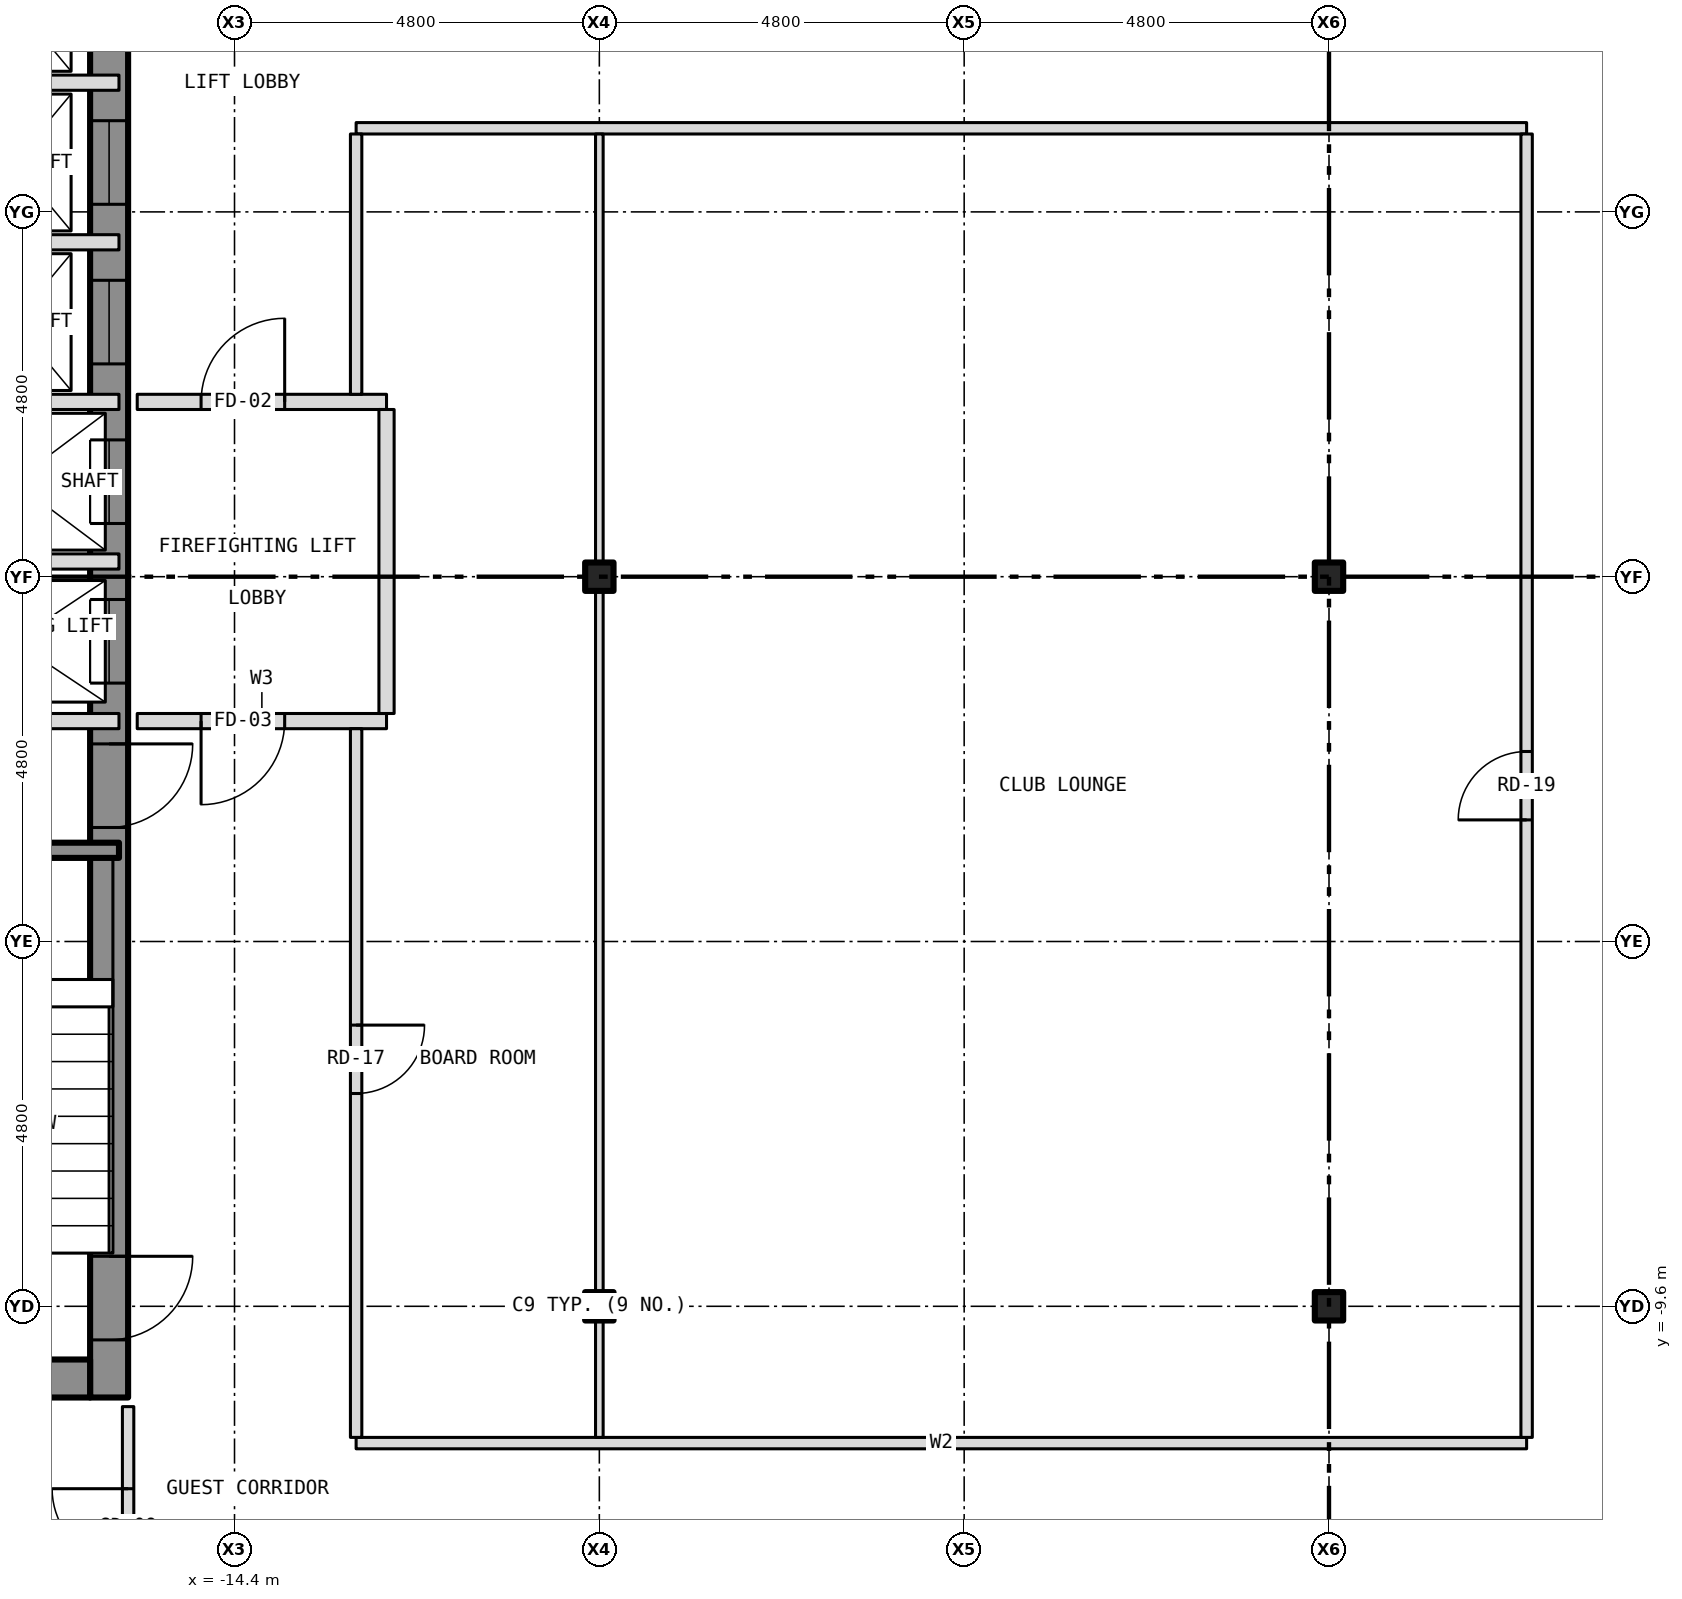
"""IFC4 building model, lengths in metres.
Left out: names, types, materials, properties, quantities, classifications, styles, units other than length and angle.
Written with IfcOpenShell. Run it as: python <this file> out.ifc"""

import sys

from ifc_helpers import new_model, si_unit, direction, frame, frame_2d, origin, origin_2d, place, context, subcontext, project, spatial, rectangle, i_section, extrude, element, fill, save


model = new_model("IFC4")
c1 = context("Model", 3, precision=1e-05, world=origin(), true_north=direction((0.0, 1.0)))
c2 = subcontext(c1, "Body", "Model", "MODEL_VIEW")
j1 = project(units=[si_unit("LENGTHUNIT", "METRE"), si_unit("PLANEANGLEUNIT", "RADIAN")], contexts=[c1])
p1 = place(None, origin())
s1 = spatial("IfcSite", under=j1, at=p1, CompositionType="ELEMENT")
p2 = place(p1, origin())
s2 = spatial("IfcBuilding", under=s1, at=p2, CompositionType="ELEMENT")
p3 = place(p2, frame((0.0, 0.0, 162.0)))
s3 = spatial("IfcBuildingStorey", under=s2, at=p3, CompositionType="ELEMENT", Elevation=162.0)
for number, where, z_axis, x_axis in (
    (1, (-9.6, -9.6, -0.15), (0.0, 0.0, 1.0), (1.0, 0.0, 0.0)),
    (2, (-9.6, 0.0, -0.15), (0.0, 0.0, 1.0), (1.0, 0.0, 0.0)),
    (3, (0.0, -9.6, -0.15), (0.0, 0.0, 1.0), (1.0, 0.0, 0.0)),
    (4, (0.0, 0.0, -0.15), (0.0, 0.0, 1.0), (1.0, 0.0, 0.0)),
):
    element("IfcColumn", number, at=place(p3, frame(where, z_axis=z_axis, x_axis=x_axis)), inside=s3, PredefinedType="COLUMN", context=c2, shape_type="SweptSolid", body=[
        extrude(i_section(OverallWidth=0.373, OverallDepth=0.373, WebThickness=0.016, FlangeThickness=0.026, at=origin_2d()), origin(), (0.0, 0.0, 1.0), 3.5),
    ])
p4 = place(p3, frame((-16.05, -10.8, 0.0), z_axis=(0.0, 0.0, 1.0), x_axis=(0.0, 1.0, 0.0)))
e5 = element("IfcWall", 5, at=p4, inside=s3, PredefinedType="SHEAR", context=c2, shape_type="SweptSolid", body=[
    extrude(rectangle(XDim=21.6, YDim=0.5, at=frame_2d((10.8, 0.0))), origin(), (0.0, 0.0, 1.0), 3.25),
])
p5 = place(p4, frame((9.4, 0.0, 0.0)))
e6 = element("IfcOpeningElement", 6, at=p5, cuts=e5, PredefinedType="OPENING", context=c2, shape_type="SweptSolid", body=[
    extrude(rectangle(XDim=1.1, YDim=2.1, at=frame_2d((0.55, 1.05))), frame((0.0, 0.262, 0.0), z_axis=(0.0, -1.0, 0.0), x_axis=(1.0, 0.0, 0.0)), (0.0, 0.0, 1.0), 0.524),
])
p6 = place(p4, frame((11.5, 0.0, 0.0)))
e7 = element("IfcOpeningElement", 7, at=p6, cuts=e5, PredefinedType="OPENING", context=c2, shape_type="SweptSolid", body=[
    extrude(rectangle(XDim=1.1, YDim=2.1, at=frame_2d((0.55, 1.05))), frame((0.0, 0.262, 0.0), z_axis=(0.0, -1.0, 0.0), x_axis=(1.0, 0.0, 0.0)), (0.0, 0.0, 1.0), 0.524),
])
p7 = place(p4, frame((13.6, 0.0, 0.0)))
e8 = element("IfcOpeningElement", 8, at=p7, cuts=e5, PredefinedType="OPENING", context=c2, shape_type="SweptSolid", body=[
    extrude(rectangle(XDim=1.1, YDim=2.1, at=frame_2d((0.55, 1.05))), frame((0.0, 0.262, 0.0), z_axis=(0.0, -1.0, 0.0), x_axis=(1.0, 0.0, 0.0)), (0.0, 0.0, 1.0), 0.524),
])
p8 = place(p4, frame((15.7, 0.0, 0.0)))
e9 = element("IfcOpeningElement", 9, at=p8, cuts=e5, PredefinedType="OPENING", context=c2, shape_type="SweptSolid", body=[
    extrude(rectangle(XDim=1.1, YDim=2.1, at=frame_2d((0.55, 1.05))), frame((0.0, 0.262, 0.0), z_axis=(0.0, -1.0, 0.0), x_axis=(1.0, 0.0, 0.0)), (0.0, 0.0, 1.0), 0.524),
])
p9 = place(p4, frame((17.8, 0.0, 0.0)))
e10 = element("IfcOpeningElement", 10, at=p9, cuts=e5, PredefinedType="OPENING", context=c2, shape_type="SweptSolid", body=[
    extrude(rectangle(XDim=1.1, YDim=2.1, at=frame_2d((0.55, 1.05))), frame((0.0, 0.262, 0.0), z_axis=(0.0, -1.0, 0.0), x_axis=(1.0, 0.0, 0.0)), (0.0, 0.0, 1.0), 0.524),
])
p10 = place(p4, frame((0.758, 0.0, 0.0)))
e11 = element("IfcOpeningElement", 11, at=p10, cuts=e5, PredefinedType="OPENING", context=c2, shape_type="SweptSolid", body=[
    extrude(rectangle(XDim=1.1, YDim=2.1, at=frame_2d((0.55, 1.05))), frame((0.0, 0.262, 0.0), z_axis=(0.0, -1.0, 0.0), x_axis=(1.0, 0.0, 0.0)), (0.0, 0.0, 1.0), 0.524),
])
p11 = place(p4, frame((7.5, 0.0, 0.0)))
e12 = element("IfcOpeningElement", 12, at=p11, cuts=e5, PredefinedType="OPENING", context=c2, shape_type="SweptSolid", body=[
    extrude(rectangle(XDim=1.1, YDim=2.1, at=frame_2d((0.55, 1.05))), frame((0.0, 0.262, 0.0), z_axis=(0.0, -1.0, 0.0), x_axis=(1.0, 0.0, 0.0)), (0.0, 0.0, 1.0), 0.524),
])
p12 = place(p4, frame((20.0, 0.0, 0.0)))
e13 = element("IfcOpeningElement", 13, at=p12, cuts=e5, PredefinedType="OPENING", context=c2, shape_type="SweptSolid", body=[
    extrude(rectangle(XDim=0.9, YDim=2.1, at=frame_2d((0.45, 1.05))), frame((0.0, 0.262, 0.0), z_axis=(0.0, -1.0, 0.0), x_axis=(1.0, 0.0, 0.0)), (0.0, 0.0, 1.0), 0.524),
])
p13 = place(p3, frame((-21.1, -10.55, 0.0), z_axis=(0.0, 0.0, 1.0), x_axis=(1.0, 0.0, 0.0)))
e14 = element("IfcWall", 14, at=p13, inside=s3, PredefinedType="SHEAR", context=c2, shape_type="SweptSolid", body=[
    extrude(rectangle(XDim=4.8, YDim=0.5, at=frame_2d((2.4, 0.0))), origin(), (0.0, 0.0, 1.0), 3.25),
])
p14 = place(p3, frame((-12.8, -11.4, 0.0), z_axis=(0.0, 0.0, 1.0), x_axis=(1.0, 0.0, 0.0)))
e15 = element("IfcWall", 15, at=p14, inside=s3, PredefinedType="PARTITIONING", context=c2, shape_type="SweptSolid", body=[
    extrude(rectangle(XDim=15.4, YDim=0.15, at=frame_2d((7.7, 0.0))), origin(), (0.0, 0.0, 1.0), 3.35),
])
p15 = place(p3, frame((-20.0, -3.6, 0.0), z_axis=(0.0, 0.0, 1.0), x_axis=(1.0, 0.0, 0.0)))
e16 = element("IfcWall", 16, at=p15, inside=s3, PredefinedType="SHEAR", context=c2, shape_type="SweptSolid", body=[
    extrude(rectangle(XDim=4.08, YDim=0.2, at=frame_2d((2.04, 0.0))), origin(), (0.0, 0.0, 1.0), 3.25),
])
p16 = place(p3, frame((-21.48, -1.9, 0.0), z_axis=(0.0, 0.0, 1.0), x_axis=(1.0, 0.0, 0.0)))
e17 = element("IfcWall", 17, at=p16, inside=s3, PredefinedType="PARTITIONING", context=c2, shape_type="SweptSolid", body=[
    extrude(rectangle(XDim=5.56, YDim=0.2, at=frame_2d((2.78, 0.0))), origin(), (0.0, 0.0, 1.0), 3.25),
])
p17 = place(p16, frame((0.83, 0.0, 0.0)))
e18 = element("IfcOpeningElement", 18, at=p17, cuts=e17, PredefinedType="OPENING", context=c2, shape_type="SweptSolid", body=[
    extrude(rectangle(XDim=0.9, YDim=2.1, at=frame_2d((0.45, 1.05))), frame((0.0, 0.112, 0.0), z_axis=(0.0, -1.0, 0.0), x_axis=(1.0, 0.0, 0.0)), (0.0, 0.0, 1.0), 0.224),
])
p18 = place(p3, frame((-15.68, -1.9, 0.0), z_axis=(0.0, 0.0, 1.0), x_axis=(1.0, 0.0, 0.0)))
e19 = element("IfcWall", 19, at=p18, inside=s3, PredefinedType="PARTITIONING", context=c2, shape_type="SweptSolid", body=[
    extrude(rectangle(XDim=3.28, YDim=0.2, at=frame_2d((1.64, 0.0))), origin(), (0.0, 0.0, 1.0), 3.35),
])
p19 = place(p18, frame((0.84, 0.0, 0.0)))
e20 = element("IfcOpeningElement", 20, at=p19, cuts=e19, PredefinedType="OPENING", context=c2, shape_type="SweptSolid", body=[
    extrude(rectangle(XDim=1.1, YDim=2.1, at=frame_2d((0.55, 1.05))), frame((0.0, 0.112, 0.0), z_axis=(0.0, -1.0, 0.0), x_axis=(1.0, 0.0, 0.0)), (0.0, 0.0, 1.0), 0.224),
])
for number, where, z_axis, x_axis in (
    (21, (-18.8, 0.2, 0.0), (0.0, 0.0, 1.0), (1.0, 0.0, 0.0)),
    (22, (-18.8, 2.3, 0.0), (0.0, 0.0, 1.0), (1.0, 0.0, 0.0)),
):
    element("IfcWall", number, at=place(p3, frame(where, z_axis=z_axis, x_axis=x_axis)), inside=s3, PredefinedType="PARTITIONING", context=c2, shape_type="SweptSolid", body=[
        extrude(rectangle(XDim=2.88, YDim=0.2, at=frame_2d((1.44, 0.0))), origin(), (0.0, 0.0, 1.0), 3.25),
    ])
p20 = place(p3, frame((-15.68, 2.3, 0.0), z_axis=(0.0, 0.0, 1.0), x_axis=(1.0, 0.0, 0.0)))
e23 = element("IfcWall", 23, at=p20, inside=s3, PredefinedType="PARTITIONING", context=c2, shape_type="SweptSolid", body=[
    extrude(rectangle(XDim=3.28, YDim=0.2, at=frame_2d((1.64, 0.0))), origin(), (0.0, 0.0, 1.0), 3.35),
])
p21 = place(p20, frame((0.84, 0.0, 0.0)))
e24 = element("IfcOpeningElement", 24, at=p21, cuts=e23, PredefinedType="OPENING", context=c2, shape_type="SweptSolid", body=[
    extrude(rectangle(XDim=1.1, YDim=2.1, at=frame_2d((0.55, 1.05))), frame((0.0, 0.112, 0.0), z_axis=(0.0, -1.0, 0.0), x_axis=(1.0, 0.0, 0.0)), (0.0, 0.0, 1.0), 0.224),
])
p22 = place(p3, frame((-18.8, 4.4, 0.0), z_axis=(0.0, 0.0, 1.0), x_axis=(1.0, 0.0, 0.0)))
e25 = element("IfcWall", 25, at=p22, inside=s3, PredefinedType="PARTITIONING", context=c2, shape_type="SweptSolid", body=[
    extrude(rectangle(XDim=2.88, YDim=0.2, at=frame_2d((1.44, 0.0))), origin(), (0.0, 0.0, 1.0), 3.25),
])
p23 = place(p3, frame((-12.8, 5.9, 0.0), z_axis=(0.0, 0.0, 1.0), x_axis=(1.0, 0.0, 0.0)))
e26 = element("IfcWall", 26, at=p23, inside=s3, PredefinedType="PARTITIONING", context=c2, shape_type="SweptSolid", body=[
    extrude(rectangle(XDim=15.4, YDim=0.15, at=frame_2d((7.7, 0.0))), origin(), (0.0, 0.0, 1.0), 3.35),
])
p24 = place(p3, frame((-18.8, 6.5, 0.0), z_axis=(0.0, 0.0, 1.0), x_axis=(1.0, 0.0, 0.0)))
e27 = element("IfcWall", 27, at=p24, inside=s3, PredefinedType="PARTITIONING", context=c2, shape_type="SweptSolid", body=[
    extrude(rectangle(XDim=2.88, YDim=0.2, at=frame_2d((1.44, 0.0))), origin(), (0.0, 0.0, 1.0), 3.25),
])
p25 = place(p3, frame((-15.8, -13.525, 0.0), z_axis=(0.0, 0.0, 1.0), x_axis=(0.0, 1.0, 0.0)))
e28 = element("IfcWall", 28, at=p25, inside=s3, PredefinedType="PARTITIONING", context=c2, shape_type="SweptSolid", body=[
    extrude(rectangle(XDim=2.605, YDim=0.15, at=frame_2d((1.302, 0.0))), origin(), (0.0, 0.0, 1.0), 3.35),
])
p26 = place(p25, frame((0.525, 0.0, 0.0)))
e29 = element("IfcOpeningElement", 29, at=p26, cuts=e28, PredefinedType="OPENING", context=c2, shape_type="SweptSolid", body=[
    extrude(rectangle(XDim=1.0, YDim=2.1, at=frame_2d((0.5, 1.05))), frame((0.0, 0.087, 0.0), z_axis=(0.0, -1.0, 0.0), x_axis=(1.0, 0.0, 0.0)), (0.0, 0.0, 1.0), 0.174),
])
p27 = place(p3, frame((-12.8, -11.325, 0.0), z_axis=(0.0, 0.0, 1.0), x_axis=(0.0, 1.0, 0.0)))
e30 = element("IfcWall", 30, at=p27, inside=s3, PredefinedType="PARTITIONING", context=c2, shape_type="SweptSolid", body=[
    extrude(rectangle(XDim=9.325, YDim=0.15, at=frame_2d((4.663, 0.0))), origin(), (0.0, 0.0, 1.0), 3.35),
])
p28 = place(p27, frame((4.525, 0.0, 0.0)))
e31 = element("IfcOpeningElement", 31, at=p28, cuts=e30, PredefinedType="OPENING", context=c2, shape_type="SweptSolid", body=[
    extrude(rectangle(XDim=0.9, YDim=2.1, at=frame_2d((0.45, 1.05))), frame((0.0, 0.087, 0.0), z_axis=(0.0, -1.0, 0.0), x_axis=(1.0, 0.0, 0.0)), (0.0, 0.0, 1.0), 0.174),
])
p29 = place(p3, frame((-12.8, 2.4, 0.0), z_axis=(0.0, 0.0, 1.0), x_axis=(0.0, 1.0, 0.0)))
e32 = element("IfcWall", 32, at=p29, inside=s3, PredefinedType="PARTITIONING", context=c2, shape_type="SweptSolid", body=[
    extrude(rectangle(XDim=3.425, YDim=0.15, at=frame_2d((1.712, 0.0))), origin(), (0.0, 0.0, 1.0), 3.35),
])
p30 = place(p3, frame((-12.4, -1.8, 0.0), z_axis=(0.0, 0.0, 1.0), x_axis=(0.0, 1.0, 0.0)))
e33 = element("IfcWall", 33, at=p30, inside=s3, PredefinedType="PARTITIONING", context=c2, shape_type="SweptSolid", body=[
    extrude(rectangle(XDim=4.0, YDim=0.2, at=frame_2d((2.0, 0.0))), origin(), (0.0, 0.0, 1.0), 3.35),
])
p31 = place(p3, frame((-9.6, -11.325, 0.0), z_axis=(0.0, 0.0, 1.0), x_axis=(0.0, 1.0, 0.0)))
e34 = element("IfcWall", 34, at=p31, inside=s3, PredefinedType="PARTITIONING", context=c2, shape_type="SweptSolid", body=[
    extrude(rectangle(XDim=1.538, YDim=0.1, at=frame_2d((0.769, 0.0))), origin(), (0.0, 0.0, 1.0), 2.728),
])
p32 = place(p3, frame((-9.6, -9.787, 0.0), z_axis=(0.0, 0.0, 1.0), x_axis=(0.0, 1.0, 0.0)))
e35 = element("IfcWall", 35, at=p32, inside=s3, PredefinedType="PARTITIONING", context=c2, shape_type="SweptSolid", body=[
    extrude(rectangle(XDim=0.374, YDim=0.1, at=frame_2d((0.187, 0.0))), origin(), (0.0, 0.0, 1.0), 3.35),
])
p33 = place(p3, frame((-9.6, -9.413, 0.0), z_axis=(0.0, 0.0, 1.0), x_axis=(0.0, 1.0, 0.0)))
e36 = element("IfcWall", 36, at=p33, inside=s3, PredefinedType="PARTITIONING", context=c2, shape_type="SweptSolid", body=[
    extrude(rectangle(XDim=9.226, YDim=0.1, at=frame_2d((4.613, 0.0))), origin(), (0.0, 0.0, 1.0), 2.728),
])
p34 = place(p3, frame((-9.6, -0.187, 0.0), z_axis=(0.0, 0.0, 1.0), x_axis=(0.0, 1.0, 0.0)))
e37 = element("IfcWall", 37, at=p34, inside=s3, PredefinedType="PARTITIONING", context=c2, shape_type="SweptSolid", body=[
    extrude(rectangle(XDim=0.374, YDim=0.1, at=frame_2d((0.187, 0.0))), origin(), (0.0, 0.0, 1.0), 3.35),
])
p35 = place(p3, frame((-9.6, 0.187, 0.0), z_axis=(0.0, 0.0, 1.0), x_axis=(0.0, 1.0, 0.0)))
e38 = element("IfcWall", 38, at=p35, inside=s3, PredefinedType="PARTITIONING", context=c2, shape_type="SweptSolid", body=[
    extrude(rectangle(XDim=5.638, YDim=0.1, at=frame_2d((2.819, 0.0))), origin(), (0.0, 0.0, 1.0), 2.728),
])
p36 = place(p3, frame((2.6, -11.325, 0.0), z_axis=(0.0, 0.0, 1.0), x_axis=(0.0, 1.0, 0.0)))
e39 = element("IfcWall", 39, at=p36, inside=s3, PredefinedType="PARTITIONING", context=c2, shape_type="SweptSolid", body=[
    extrude(rectangle(XDim=17.15, YDim=0.15, at=frame_2d((8.575, 0.0))), origin(), (0.0, 0.0, 1.0), 3.35),
])
p37 = place(p36, frame((8.125, 0.0, 0.0)))
e40 = element("IfcOpeningElement", 40, at=p37, cuts=e39, PredefinedType="OPENING", context=c2, shape_type="SweptSolid", body=[
    extrude(rectangle(XDim=0.9, YDim=2.1, at=frame_2d((0.45, 1.05))), frame((0.0, 0.087, 0.0), z_axis=(0.0, -1.0, 0.0), x_axis=(1.0, 0.0, 0.0)), (0.0, 0.0, 1.0), 0.174),
])
p38 = place(p5, origin())
e41 = element("IfcDoor", 41, at=p38, inside=s3, OperationType="SLIDING_TO_LEFT", PredefinedType="DOOR", context=c2, shape_type="SweptSolid", body=[
    extrude(rectangle(XDim=1.1, YDim=2.1, at=frame_2d((0.55, 1.05))), frame((0.0, 0.025, 0.0), z_axis=(0.0, -1.0, 0.0), x_axis=(1.0, 0.0, 0.0)), (0.0, 0.0, 1.0), 0.05),
])
fill(e6, e41)
p39 = place(p6, origin())
e42 = element("IfcDoor", 42, at=p39, inside=s3, OperationType="SLIDING_TO_LEFT", PredefinedType="DOOR", context=c2, shape_type="SweptSolid", body=[
    extrude(rectangle(XDim=1.1, YDim=2.1, at=frame_2d((0.55, 1.05))), frame((0.0, 0.025, 0.0), z_axis=(0.0, -1.0, 0.0), x_axis=(1.0, 0.0, 0.0)), (0.0, 0.0, 1.0), 0.05),
])
fill(e7, e42)
p40 = place(p7, origin())
e43 = element("IfcDoor", 43, at=p40, inside=s3, OperationType="SLIDING_TO_LEFT", PredefinedType="DOOR", context=c2, shape_type="SweptSolid", body=[
    extrude(rectangle(XDim=1.1, YDim=2.1, at=frame_2d((0.55, 1.05))), frame((0.0, 0.025, 0.0), z_axis=(0.0, -1.0, 0.0), x_axis=(1.0, 0.0, 0.0)), (0.0, 0.0, 1.0), 0.05),
])
fill(e8, e43)
p41 = place(p8, origin())
e44 = element("IfcDoor", 44, at=p41, inside=s3, OperationType="SLIDING_TO_LEFT", PredefinedType="DOOR", context=c2, shape_type="SweptSolid", body=[
    extrude(rectangle(XDim=1.1, YDim=2.1, at=frame_2d((0.55, 1.05))), frame((0.0, 0.025, 0.0), z_axis=(0.0, -1.0, 0.0), x_axis=(1.0, 0.0, 0.0)), (0.0, 0.0, 1.0), 0.05),
])
fill(e9, e44)
p42 = place(p10, origin())
e45 = element("IfcDoor", 45, at=p42, inside=s3, OperationType="SINGLE_SWING_RIGHT", PredefinedType="DOOR", context=c2, shape_type="SweptSolid", body=[
    extrude(rectangle(XDim=1.1, YDim=2.1, at=frame_2d((0.55, 1.05))), frame((0.0, 0.025, 0.0), z_axis=(0.0, -1.0, 0.0), x_axis=(1.0, 0.0, 0.0)), (0.0, 0.0, 1.0), 0.05),
])
fill(e11, e45)
p43 = place(p11, origin())
e46 = element("IfcDoor", 46, at=p43, inside=s3, OperationType="SINGLE_SWING_RIGHT", PredefinedType="DOOR", context=c2, shape_type="SweptSolid", body=[
    extrude(rectangle(XDim=1.1, YDim=2.1, at=frame_2d((0.55, 1.05))), frame((0.0, 0.025, 0.0), z_axis=(0.0, -1.0, 0.0), x_axis=(1.0, 0.0, 0.0)), (0.0, 0.0, 1.0), 0.05),
])
fill(e12, e46)
p44 = place(p21, origin())
e47 = element("IfcDoor", 47, at=p44, inside=s3, OperationType="SINGLE_SWING_RIGHT", PredefinedType="DOOR", context=c2, shape_type="SweptSolid", body=[
    extrude(rectangle(XDim=1.1, YDim=2.1, at=frame_2d((0.55, 1.05))), frame((0.0, 0.025, 0.0), z_axis=(0.0, -1.0, 0.0), x_axis=(1.0, 0.0, 0.0)), (0.0, 0.0, 1.0), 0.05),
])
fill(e24, e47)
p45 = place(p19, origin())
e48 = element("IfcDoor", 48, at=p45, inside=s3, OperationType="SINGLE_SWING_LEFT", PredefinedType="DOOR", context=c2, shape_type="SweptSolid", body=[
    extrude(rectangle(XDim=1.1, YDim=2.1, at=frame_2d((0.55, 1.05))), frame((0.0, 0.025, 0.0), z_axis=(0.0, -1.0, 0.0), x_axis=(1.0, 0.0, 0.0)), (0.0, 0.0, 1.0), 0.05),
])
fill(e20, e48)
p46 = place(p26, origin())
e49 = element("IfcDoor", 49, at=p46, inside=s3, OperationType="SINGLE_SWING_RIGHT", PredefinedType="DOOR", context=c2, shape_type="SweptSolid", body=[
    extrude(rectangle(XDim=1.0, YDim=2.1, at=frame_2d((0.5, 1.05))), frame((0.0, 0.025, 0.0), z_axis=(0.0, -1.0, 0.0), x_axis=(1.0, 0.0, 0.0)), (0.0, 0.0, 1.0), 0.05),
])
fill(e29, e49)
p47 = place(p28, origin())
e50 = element("IfcDoor", 50, at=p47, inside=s3, OperationType="SINGLE_SWING_RIGHT", PredefinedType="DOOR", context=c2, shape_type="SweptSolid", body=[
    extrude(rectangle(XDim=0.9, YDim=2.1, at=frame_2d((0.45, 1.05))), frame((0.0, 0.025, 0.0), z_axis=(0.0, -1.0, 0.0), x_axis=(1.0, 0.0, 0.0)), (0.0, 0.0, 1.0), 0.05),
])
fill(e31, e50)
p48 = place(p37, origin())
e51 = element("IfcDoor", 51, at=p48, inside=s3, OperationType="SINGLE_SWING_LEFT", PredefinedType="DOOR", context=c2, shape_type="SweptSolid", body=[
    extrude(rectangle(XDim=0.9, YDim=2.1, at=frame_2d((0.45, 1.05))), frame((0.0, 0.025, 0.0), z_axis=(0.0, -1.0, 0.0), x_axis=(1.0, 0.0, 0.0)), (0.0, 0.0, 1.0), 0.05),
])
fill(e40, e51)
save(model, sys.argv[1])
